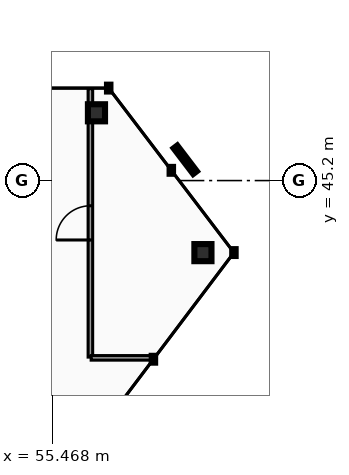
"""IFC4 building model, lengths in metres.
Left out: names, types, materials, properties, quantities, classifications, styles, units other than length and angle.
Written with IfcOpenShell. Run it as: python <this file> out.ifc"""

import sys

from ifc_helpers import new_model, si_unit, direction, frame, frame_2d, origin, origin_2d, place, context, subcontext, project, spatial, rectangle, hollow_rectangle, extrude, element, fill, save


model = new_model("IFC4")
c1 = context("Model", 3, precision=1e-05, world=origin(), true_north=direction((0.0, 1.0)))
c2 = subcontext(c1, "Body", "Model", "MODEL_VIEW")
j1 = project(units=[si_unit("LENGTHUNIT", "METRE"), si_unit("PLANEANGLEUNIT", "RADIAN")], contexts=[c1])
p1 = place(None, origin())
s1 = spatial("IfcSite", under=j1, at=p1, CompositionType="ELEMENT")
p2 = place(p1, origin())
s2 = spatial("IfcBuilding", under=s1, at=p2, CompositionType="ELEMENT")
p3 = place(p2, frame((0.0, 0.0, 278.8)))
s3 = spatial("IfcBuildingStorey", under=s2, at=p3, CompositionType="ELEMENT", Elevation=278.8)
for number, where, z_axis, x_axis in (
    (1, (56.633, 46.983, 0.0), (0.0, 0.0, 1.0), (1.0, 0.0, 0.0)),
    (2, (59.435, 43.304, 0.0), (0.0, 0.0, 1.0), (1.0, 0.0, 0.0)),
):
    element("IfcColumn", number, at=place(p3, frame(where, z_axis=z_axis, x_axis=x_axis)), inside=s3, PredefinedType="COLUMN", context=c2, shape_type="SweptSolid", body=[
        extrude(hollow_rectangle(XDim=0.45, YDim=0.45, WallThickness=0.022, at=origin_2d()), origin(), (0.0, 0.0, 1.0), 3.18),
    ])
p4 = place(p3, frame((56.473, 40.555, 0.0), z_axis=(0.0, 0.0, 1.0), x_axis=(0.0, 1.0, 0.0)))
e3 = element("IfcWall", 3, at=p4, inside=s3, PredefinedType="PARTITIONING", context=c2, shape_type="SweptSolid", body=[
    extrude(rectangle(XDim=7.063, YDim=0.12, at=frame_2d((3.532, 0.0))), origin(), (0.0, 0.0, 1.0), 2.235),
])
p5 = place(p4, frame((3.082, 0.0, 0.0)))
e4 = element("IfcOpeningElement", 4, at=p5, cuts=e3, PredefinedType="OPENING", context=c2, shape_type="SweptSolid", body=[
    extrude(rectangle(XDim=0.9, YDim=2.05, at=frame_2d((0.45, 1.025))), frame((0.0, 0.07, 0.0), z_axis=(0.0, -1.0, 0.0), x_axis=(1.0, 0.0, 0.0)), (0.0, 0.0, 1.0), 0.14),
])
p6 = place(p3, frame((56.493, 40.535, 0.0), z_axis=(0.0, 0.0, 1.0), x_axis=(1.0, 0.0, 0.0)))
e5 = element("IfcWall", 5, at=p6, inside=s3, PredefinedType="PARTITIONING", context=c2, shape_type="SweptSolid", body=[
    extrude(rectangle(XDim=1.651, YDim=0.12, at=frame_2d((0.825, 0.0))), origin(), (0.0, 0.0, 1.0), 2.235),
])
p7 = place(p5, origin())
e6 = element("IfcDoor", 6, at=p7, inside=s3, OperationType="SINGLE_SWING_LEFT", PredefinedType="DOOR", context=c2, shape_type="SweptSolid", body=[
    extrude(rectangle(XDim=0.9, YDim=2.05, at=frame_2d((0.45, 1.025))), frame((0.0, 0.025, 0.0), z_axis=(0.0, -1.0, 0.0), x_axis=(1.0, 0.0, 0.0)), (0.0, 0.0, 1.0), 0.05),
])
fill(e4, e6)
save(model, sys.argv[1])
